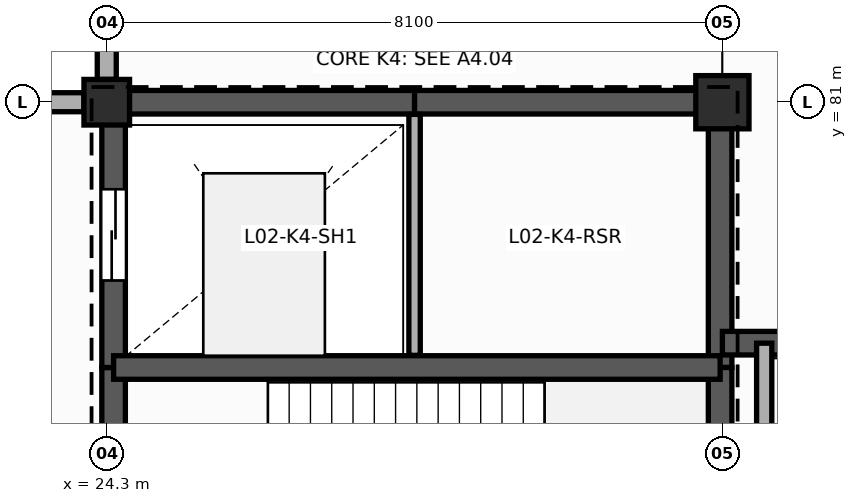
"""IFC4 building model, lengths in metres.
Left out: names, types, materials, properties, quantities, classifications, styles, units other than length and angle.
Written with IfcOpenShell. Run it as: python <this file> out.ifc"""

import sys

from ifc_helpers import new_model, si_unit, direction, frame, frame_2d, origin, origin_2d, place, context, subcontext, project, spatial, rectangle, extrude, element, fill, save


model = new_model("IFC4")
c1 = context("Model", 3, precision=1e-05, world=origin(), true_north=direction((0.0, 1.0)))
c2 = subcontext(c1, "Body", "Model", "MODEL_VIEW")
j1 = project(units=[si_unit("LENGTHUNIT", "METRE"), si_unit("PLANEANGLEUNIT", "RADIAN")], contexts=[c1])
p1 = place(None, origin())
s1 = spatial("IfcSite", under=j1, at=p1, CompositionType="ELEMENT")
p2 = place(p1, origin())
s2 = spatial("IfcBuilding", under=s1, at=p2, CompositionType="ELEMENT")
p3 = place(p2, frame((0.0, 0.0, 10.2)))
s3 = spatial("IfcBuildingStorey", under=s2, at=p3, CompositionType="ELEMENT", Elevation=10.2)
p4 = place(p3, frame((24.3, 81.0, 0.0), z_axis=(0.0, 0.0, 1.0), x_axis=(1.0, 0.0, 0.0)))
e1 = element("IfcColumn", 1, at=p4, inside=s3, PredefinedType="COLUMN", context=c2, shape_type="SweptSolid", body=[
    extrude(rectangle(XDim=0.6, YDim=0.6, at=origin_2d()), origin(), (0.0, 0.0, 1.0), 4.8),
])
p5 = place(p3, frame((32.4, 81.0, 0.0), z_axis=(0.0, 0.0, 1.0), x_axis=(1.0, 0.0, 0.0)))
e2 = element("IfcColumn", 2, at=p5, inside=s3, PredefinedType="COLUMN", context=c2, shape_type="SweptSolid", body=[
    extrude(rectangle(XDim=0.7, YDim=0.7, at=origin_2d()), origin(), (0.0, 0.0, 1.0), 4.8),
])
p6 = place(p3, frame((24.39, 73.15, 0.0), z_axis=(0.0, 0.0, 1.0), x_axis=(0.0, 1.0, 0.0)))
e3 = element("IfcWall", 3, at=p6, inside=s3, PredefinedType="SHEAR", context=c2, shape_type="SweptSolid", body=[
    extrude(rectangle(XDim=4.36, YDim=0.31, at=frame_2d((2.18, 0.0))), origin(), (0.0, 0.0, 1.0), 4.8),
])
p7 = place(p6, frame((1.35, 0.0, 0.0)))
e4 = element("IfcOpeningElement", 4, at=p7, cuts=e3, PredefinedType="OPENING", context=c2, shape_type="SweptSolid", body=[
    extrude(rectangle(XDim=1.2, YDim=2.25, at=frame_2d((0.6, 1.125))), frame((0.0, 0.165, 0.0), z_axis=(0.0, -1.0, 0.0), x_axis=(1.0, 0.0, 0.0)), (0.0, 0.0, 1.0), 0.33),
])
p8 = place(p3, frame((24.39, 77.51, 0.0), z_axis=(0.0, 0.0, 1.0), x_axis=(0.0, 1.0, 0.0)))
e5 = element("IfcWall", 5, at=p8, inside=s3, PredefinedType="SHEAR", context=c2, shape_type="SweptSolid", body=[
    extrude(rectangle(XDim=3.49, YDim=0.31, at=frame_2d((1.745, 0.0))), origin(), (0.0, 0.0, 1.0), 4.8),
])
p9 = place(p8, frame((1.145, 0.0, 0.0)))
e6 = element("IfcOpeningElement", 6, at=p9, cuts=e5, PredefinedType="OPENING", context=c2, shape_type="SweptSolid", body=[
    extrude(rectangle(XDim=1.2, YDim=2.2, at=frame_2d((0.6, 1.1))), frame((0.0, 0.165, 0.0), z_axis=(0.0, -1.0, 0.0), x_axis=(1.0, 0.0, 0.0)), (0.0, 0.0, 1.0), 0.33),
])
p10 = place(p3, frame((24.39, 81.0, 0.0), z_axis=(0.0, 0.0, 1.0), x_axis=(1.0, 0.0, 0.0)))
e7 = element("IfcWall", 7, at=p10, inside=s3, PredefinedType="SHEAR", context=c2, shape_type="SweptSolid", body=[
    extrude(rectangle(XDim=3.96, YDim=0.31, at=frame_2d((1.98, 0.0))), origin(), (0.0, 0.0, 1.0), 4.8),
])
p11 = place(p3, frame((28.35, 81.0, 0.0), z_axis=(0.0, 0.0, 1.0), x_axis=(1.0, 0.0, 0.0)))
e8 = element("IfcWall", 8, at=p11, inside=s3, PredefinedType="SHEAR", context=c2, shape_type="SweptSolid", body=[
    extrude(rectangle(XDim=4.02, YDim=0.31, at=frame_2d((2.01, 0.0))), origin(), (0.0, 0.0, 1.0), 4.8),
])
p12 = place(p3, frame((32.37, 81.0, 0.0), z_axis=(0.0, 0.0, 1.0), x_axis=(0.0, -1.0, 0.0)))
e9 = element("IfcWall", 9, at=p12, inside=s3, PredefinedType="SHEAR", context=c2, shape_type="SweptSolid", body=[
    extrude(rectangle(XDim=3.49, YDim=0.31, at=frame_2d((1.745, 0.0))), origin(), (0.0, 0.0, 1.0), 4.8),
])
p13 = place(p3, frame((32.37, 77.51, 0.0), z_axis=(0.0, 0.0, 1.0), x_axis=(0.0, -1.0, 0.0)))
e10 = element("IfcWall", 10, at=p13, inside=s3, PredefinedType="SHEAR", context=c2, shape_type="SweptSolid", body=[
    extrude(rectangle(XDim=4.36, YDim=0.31, at=frame_2d((2.18, 0.0))), origin(), (0.0, 0.0, 1.0), 4.8),
])
p14 = place(p3, frame((24.39, 77.51, 0.0), z_axis=(0.0, 0.0, 1.0), x_axis=(1.0, 0.0, 0.0)))
e11 = element("IfcWall", 11, at=p14, inside=s3, PredefinedType="SHEAR", context=c2, shape_type="SweptSolid", body=[
    extrude(rectangle(XDim=7.98, YDim=0.31, at=frame_2d((3.99, 0.0))), origin(), (0.0, 0.0, 1.0), 4.8),
])
p15 = place(p3, frame((28.35, 77.67, 0.0), z_axis=(0.0, 0.0, 1.0), x_axis=(0.0, 1.0, 0.0)))
e12 = element("IfcWall", 12, at=p15, inside=s3, PredefinedType="PLUMBINGWALL", context=c2, shape_type="SweptSolid", body=[
    extrude(rectangle(XDim=3.17, YDim=0.15, at=frame_2d((1.585, 0.0))), origin(), (0.0, 0.0, 1.0), 4.45),
])
p16 = place(p3, frame((41.195, 77.83, 0.0), z_axis=(0.0, 0.0, 1.0), x_axis=(-1.0, 0.0, 0.0)))
e13 = element("IfcWall", 13, at=p16, inside=s3, PredefinedType="SHEAR", context=c2, shape_type="SweptSolid", body=[
    extrude(rectangle(XDim=8.795, YDim=0.31, at=frame_2d((4.397, 0.0))), origin(), (0.0, 0.0, 1.0), 4.8),
])
p17 = place(p3, frame((32.95, 73.35, 0.0), z_axis=(0.0, 0.0, 1.0), x_axis=(0.0, 1.0, 0.0)))
e14 = element("IfcWall", 14, at=p17, inside=s3, PredefinedType="PARTITIONING", context=c2, shape_type="SweptSolid", body=[
    extrude(rectangle(XDim=4.48, YDim=0.2, at=frame_2d((2.24, 0.0))), origin(), (0.0, 0.0, 1.0), 4.45),
])
p18 = place(p17, frame((1.25, 0.0, 0.0)))
e15 = element("IfcOpeningElement", 15, at=p18, cuts=e14, PredefinedType="OPENING", context=c2, shape_type="SweptSolid", body=[
    extrude(rectangle(XDim=1.2, YDim=2.25, at=frame_2d((0.6, 1.125))), frame((0.0, 0.11, 0.0), z_axis=(0.0, -1.0, 0.0), x_axis=(1.0, 0.0, 0.0)), (0.0, 0.0, 1.0), 0.22),
])
p19 = place(p3, frame((16.5, 81.0, 0.0), z_axis=(0.0, 0.0, 1.0), x_axis=(1.0, 0.0, 0.0)))
e16 = element("IfcWall", 16, at=p19, inside=s3, PredefinedType="SOLIDWALL", context=c2, shape_type="SweptSolid", body=[
    extrude(rectangle(XDim=7.5, YDim=0.25, at=frame_2d((3.75, 0.0))), origin(), (0.0, 0.0, 1.0), 3.774),
])
p20 = place(p3, frame((24.3, 81.3, 0.0), z_axis=(0.0, 0.0, 1.0), x_axis=(0.0, 1.0, 0.0)))
e17 = element("IfcWall", 17, at=p20, inside=s3, PredefinedType="SOLIDWALL", context=c2, shape_type="SweptSolid", body=[
    extrude(rectangle(XDim=7.5, YDim=0.25, at=frame_2d((3.75, 0.0))), origin(), (0.0, 0.0, 1.0), 3.984),
])
p21 = place(p9, origin())
e18 = element("IfcDoor", 18, at=p21, inside=s3, OperationType="SLIDING_TO_LEFT", PredefinedType="DOOR", context=c2, shape_type="SweptSolid", body=[
    extrude(rectangle(XDim=1.2, YDim=2.2, at=frame_2d((0.6, 1.1))), frame((0.0, 0.025, 0.0), z_axis=(0.0, -1.0, 0.0), x_axis=(1.0, 0.0, 0.0)), (0.0, 0.0, 1.0), 0.05),
])
fill(e6, e18)
save(model, sys.argv[1])
